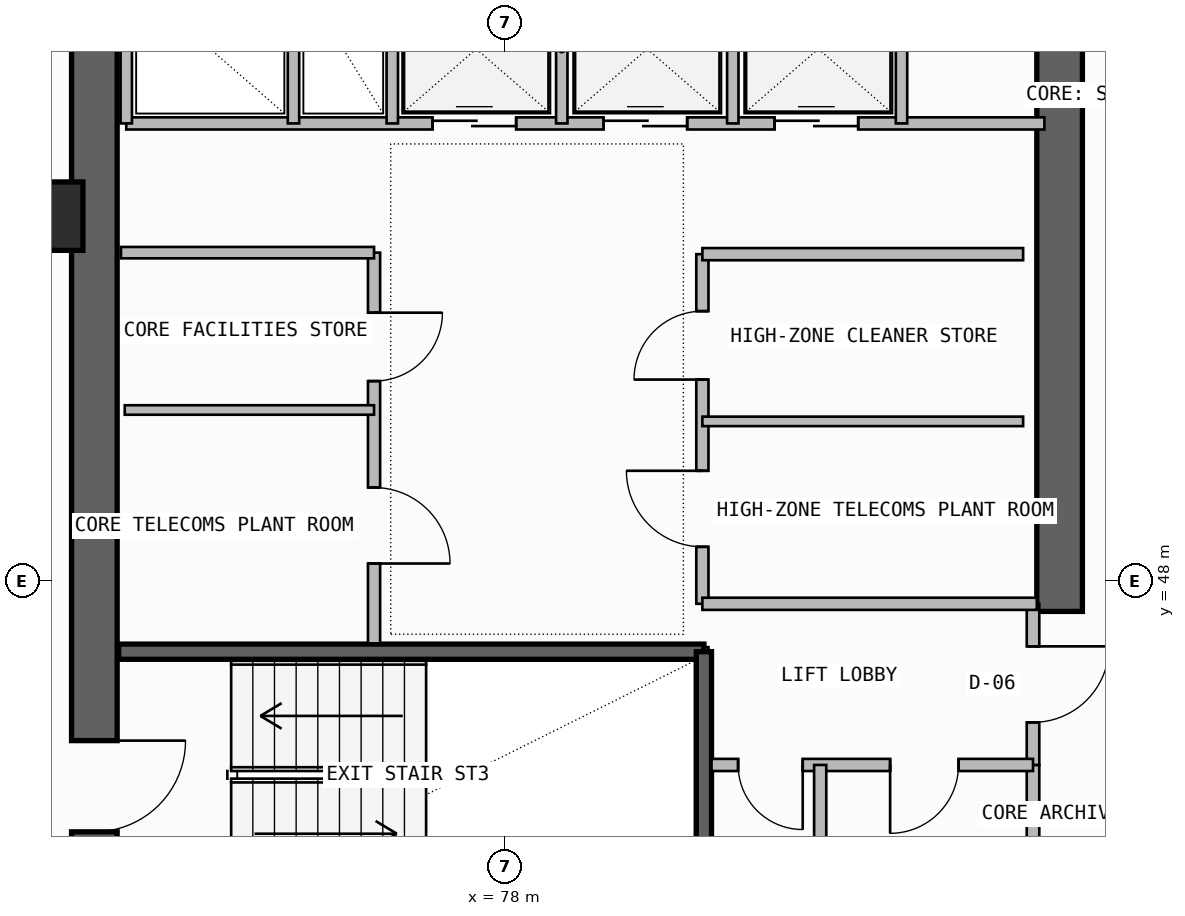
"""IFC4 building model, lengths in metres.
Left out: names, types, materials, properties, quantities, classifications, styles, units other than length and angle.
Written with IfcOpenShell. Run it as: python <this file> out.ifc"""

import sys

from ifc_helpers import new_model, si_unit, direction, frame, frame_2d, origin, origin_2d, place, context, subcontext, project, spatial, rectangle, extrude, element, fill, save


model = new_model("IFC4")
c1 = context("Model", 3, precision=1e-05, world=origin(), true_north=direction((0.0, 1.0)))
c2 = subcontext(c1, "Body", "Model", "MODEL_VIEW")
j1 = project(units=[si_unit("LENGTHUNIT", "METRE"), si_unit("PLANEANGLEUNIT", "RADIAN")], contexts=[c1])
p1 = place(None, origin())
s1 = spatial("IfcSite", under=j1, at=p1, CompositionType="ELEMENT")
p2 = place(p1, origin())
s2 = spatial("IfcBuilding", under=s1, at=p2, CompositionType="ELEMENT")
p3 = place(p2, frame((0.0, 0.0, 246.66)))
s3 = spatial("IfcBuildingStorey", under=s2, at=p3, CompositionType="ELEMENT", Elevation=246.66)
p4 = place(p3, frame((72.6, 43.35, -0.26), z_axis=(0.0, 0.0, 1.0), x_axis=(0.0, 1.0, 0.0)))
e1 = element("IfcWall", 1, at=p4, inside=s3, PredefinedType="SHEAR", context=c2, shape_type="SweptSolid", body=[
    extrude(rectangle(XDim=12.7, YDim=0.6, at=frame_2d((6.35, 0.0))), origin(), (0.0, 0.0, 1.0), 3.52),
])
p5 = place(p4, frame((1.35, 0.0, 0.26)))
e2 = element("IfcOpeningElement", 2, at=p5, cuts=e1, PredefinedType="OPENING", context=c2, shape_type="SweptSolid", body=[
    extrude(rectangle(XDim=1.2, YDim=2.2, at=frame_2d((0.6, 1.1))), frame((0.0, 0.31, 0.0), z_axis=(0.0, -1.0, 0.0), x_axis=(1.0, 0.0, 0.0)), (0.0, 0.0, 1.0), 0.62),
])
p6 = place(p3, frame((85.3, 47.6, -0.26), z_axis=(0.0, 0.0, 1.0), x_axis=(0.0, 1.0, 0.0)))
e3 = element("IfcWall", 3, at=p6, inside=s3, PredefinedType="SHEAR", context=c2, shape_type="SweptSolid", body=[
    extrude(rectangle(XDim=8.45, YDim=0.6, at=frame_2d((4.225, 0.0))), origin(), (0.0, 0.0, 1.0), 3.52),
])
p7 = place(p3, frame((72.0, 52.8, 0.0), z_axis=(0.0, 0.0, 1.0), x_axis=(1.0, 0.0, 0.0)))
e4 = element("IfcColumn", 4, at=p7, inside=s3, PredefinedType="COLUMN", context=c2, shape_type="SweptSolid", body=[
    extrude(rectangle(XDim=0.9, YDim=0.9, at=origin_2d()), origin(), (0.0, 0.0, 1.0), 3.52),
])
p8 = place(p3, frame((72.92, 47.07, -0.26), z_axis=(0.0, 0.0, 1.0), x_axis=(1.0, 0.0, 0.0)))
e5 = element("IfcWall", 5, at=p8, inside=s3, PredefinedType="SOLIDWALL", context=c2, shape_type="SweptSolid", body=[
    extrude(rectangle(XDim=7.7, YDim=0.2, at=frame_2d((3.85, 0.0))), origin(), (0.0, 0.0, 1.0), 3.52),
])
p9 = place(p3, frame((80.62, 43.83, -0.26), z_axis=(0.0, 0.0, 1.0), x_axis=(0.0, 1.0, 0.0)))
e6 = element("IfcWall", 6, at=p9, inside=s3, PredefinedType="SOLIDWALL", context=c2, shape_type="SweptSolid", body=[
    extrude(rectangle(XDim=3.24, YDim=0.2, at=frame_2d((1.62, 0.0))), origin(), (0.0, 0.0, 1.0), 3.52),
])
p10 = place(p3, frame((84.95, 43.68, 0.0), z_axis=(0.0, 0.0, 1.0), x_axis=(0.0, 1.0, 0.0)))
e7 = element("IfcWall", 7, at=p10, inside=s3, PredefinedType="PLUMBINGWALL", context=c2, shape_type="SweptSolid", body=[
    extrude(rectangle(XDim=1.9, YDim=0.165, at=frame_2d((0.95, 0.0))), origin(), (0.0, 0.0, 1.0), 3.26),
])
p11 = place(p3, frame((84.95, 45.58, 0.0), z_axis=(0.0, 0.0, 1.0), x_axis=(0.0, 1.0, 0.0)))
e8 = element("IfcWall", 8, at=p11, inside=s3, PredefinedType="PARTITIONING", context=c2, shape_type="SweptSolid", body=[
    extrude(rectangle(XDim=2.12, YDim=0.165, at=frame_2d((1.06, 0.0))), origin(), (0.0, 0.0, 1.0), 3.26),
])
p12 = place(p11, frame((0.56, 0.0, 0.0)))
e9 = element("IfcOpeningElement", 9, at=p12, cuts=e8, PredefinedType="OPENING", context=c2, shape_type="SweptSolid", body=[
    extrude(rectangle(XDim=1.0, YDim=2.2, at=frame_2d((0.5, 1.1))), frame((0.0, 0.093, 0.0), z_axis=(0.0, -1.0, 0.0), x_axis=(1.0, 0.0, 0.0)), (0.0, 0.0, 1.0), 0.185),
])
p13 = place(p3, frame((80.72, 45.58, 0.0), z_axis=(0.0, 0.0, 1.0), x_axis=(1.0, 0.0, 0.0)))
e10 = element("IfcWall", 10, at=p13, inside=s3, PredefinedType="PLUMBINGWALL", context=c2, shape_type="SweptSolid", body=[
    extrude(rectangle(XDim=4.23, YDim=0.16, at=frame_2d((2.115, 0.0))), origin(), (0.0, 0.0, 1.0), 3.26),
])
p14 = place(p13, frame((0.35, 0.0, 0.0)))
e11 = element("IfcOpeningElement", 11, at=p14, cuts=e10, PredefinedType="OPENING", context=c2, shape_type="SweptSolid", body=[
    extrude(rectangle(XDim=0.85, YDim=2.05, at=frame_2d((0.425, 1.025))), frame((0.0, 0.09, 0.0), z_axis=(0.0, -1.0, 0.0), x_axis=(1.0, 0.0, 0.0)), (0.0, 0.0, 1.0), 0.18),
])
p15 = place(p13, frame((2.35, 0.0, 0.0)))
e12 = element("IfcOpeningElement", 12, at=p15, cuts=e10, PredefinedType="OPENING", context=c2, shape_type="SweptSolid", body=[
    extrude(rectangle(XDim=0.9, YDim=2.1, at=frame_2d((0.45, 1.05))), frame((0.0, 0.09, 0.0), z_axis=(0.0, -1.0, 0.0), x_axis=(1.0, 0.0, 0.0)), (0.0, 0.0, 1.0), 0.18),
])
p16 = place(p3, frame((82.15, 43.68, 0.0), z_axis=(0.0, 0.0, 1.0), x_axis=(0.0, 1.0, 0.0)))
e13 = element("IfcWall", 13, at=p16, inside=s3, PredefinedType="PLUMBINGWALL", context=c2, shape_type="SweptSolid", body=[
    extrude(rectangle(XDim=1.9, YDim=0.16, at=frame_2d((0.95, 0.0))), origin(), (0.0, 0.0, 1.0), 3.26),
])
p17 = place(p3, frame((76.28, 47.18, 0.0), z_axis=(0.0, 0.0, 1.0), x_axis=(0.0, 1.0, 0.0)))
e14 = element("IfcWall", 14, at=p17, inside=s3, PredefinedType="SOLIDWALL", context=c2, shape_type="SweptSolid", body=[
    extrude(rectangle(XDim=5.14, YDim=0.16, at=frame_2d((2.57, 0.0))), origin(), (0.0, 0.0, 1.0), 3.26),
])
p18 = place(p17, frame((1.05, 0.0, 0.0)))
e15 = element("IfcOpeningElement", 15, at=p18, cuts=e14, PredefinedType="OPENING", context=c2, shape_type="SweptSolid", body=[
    extrude(rectangle(XDim=1.0, YDim=2.2, at=frame_2d((0.5, 1.1))), frame((0.0, 0.09, 0.0), z_axis=(0.0, -1.0, 0.0), x_axis=(1.0, 0.0, 0.0)), (0.0, 0.0, 1.0), 0.18),
])
p19 = place(p17, frame((3.45, 0.0, 0.0)))
e16 = element("IfcOpeningElement", 16, at=p19, cuts=e14, PredefinedType="OPENING", context=c2, shape_type="SweptSolid", body=[
    extrude(rectangle(XDim=0.9, YDim=2.1, at=frame_2d((0.45, 1.05))), frame((0.0, 0.09, 0.0), z_axis=(0.0, -1.0, 0.0), x_axis=(1.0, 0.0, 0.0)), (0.0, 0.0, 1.0), 0.18),
])
p20 = place(p3, frame((72.95, 52.32, 0.0), z_axis=(0.0, 0.0, 1.0), x_axis=(1.0, 0.0, 0.0)))
e17 = element("IfcWall", 17, at=p20, inside=s3, PredefinedType="SOLIDWALL", context=c2, shape_type="SweptSolid", body=[
    extrude(rectangle(XDim=3.33, YDim=0.15, at=frame_2d((1.665, 0.0))), origin(), (0.0, 0.0, 1.0), 3.26),
])
p21 = place(p3, frame((73.0, 50.25, 0.0), z_axis=(0.0, 0.0, 1.0), x_axis=(1.0, 0.0, 0.0)))
e18 = element("IfcWall", 18, at=p21, inside=s3, PredefinedType="PARTITIONING", context=c2, shape_type="SweptSolid", body=[
    extrude(rectangle(XDim=3.28, YDim=0.125, at=frame_2d((1.64, 0.0))), origin(), (0.0, 0.0, 1.0), 3.26),
])
p22 = place(p3, frame((80.6, 47.7, 0.0), z_axis=(0.0, 0.0, 1.0), x_axis=(0.0, 1.0, 0.0)))
e19 = element("IfcWall", 19, at=p22, inside=s3, PredefinedType="SOLIDWALL", context=c2, shape_type="SweptSolid", body=[
    extrude(rectangle(XDim=4.6, YDim=0.16, at=frame_2d((2.3, 0.0))), origin(), (0.0, 0.0, 1.0), 3.26),
])
p23 = place(p22, frame((0.75, 0.0, 0.0)))
e20 = element("IfcOpeningElement", 20, at=p23, cuts=e19, PredefinedType="OPENING", context=c2, shape_type="SweptSolid", body=[
    extrude(rectangle(XDim=1.0, YDim=2.2, at=frame_2d((0.5, 1.1))), frame((0.0, 0.09, 0.0), z_axis=(0.0, -1.0, 0.0), x_axis=(1.0, 0.0, 0.0)), (0.0, 0.0, 1.0), 0.18),
])
p24 = place(p22, frame((2.95, 0.0, 0.0)))
e21 = element("IfcOpeningElement", 21, at=p24, cuts=e19, PredefinedType="OPENING", context=c2, shape_type="SweptSolid", body=[
    extrude(rectangle(XDim=0.9, YDim=2.1, at=frame_2d((0.45, 1.05))), frame((0.0, 0.09, 0.0), z_axis=(0.0, -1.0, 0.0), x_axis=(1.0, 0.0, 0.0)), (0.0, 0.0, 1.0), 0.18),
])
p25 = place(p3, frame((80.6, 47.7, 0.0), z_axis=(0.0, 0.0, 1.0), x_axis=(1.0, 0.0, 0.0)))
e22 = element("IfcWall", 22, at=p25, inside=s3, PredefinedType="SOLIDWALL", context=c2, shape_type="SweptSolid", body=[
    extrude(rectangle(XDim=4.4, YDim=0.16, at=frame_2d((2.2, 0.0))), origin(), (0.0, 0.0, 1.0), 3.26),
])
p26 = place(p3, frame((80.6, 52.3, 0.0), z_axis=(0.0, 0.0, 1.0), x_axis=(1.0, 0.0, 0.0)))
e23 = element("IfcWall", 23, at=p26, inside=s3, PredefinedType="SOLIDWALL", context=c2, shape_type="SweptSolid", body=[
    extrude(rectangle(XDim=4.22, YDim=0.16, at=frame_2d((2.11, 0.0))), origin(), (0.0, 0.0, 1.0), 3.26),
])
p27 = place(p3, frame((80.6, 50.1, 0.0), z_axis=(0.0, 0.0, 1.0), x_axis=(1.0, 0.0, 0.0)))
e24 = element("IfcWall", 24, at=p27, inside=s3, PredefinedType="PARTITIONING", context=c2, shape_type="SweptSolid", body=[
    extrude(rectangle(XDim=4.22, YDim=0.125, at=frame_2d((2.11, 0.0))), origin(), (0.0, 0.0, 1.0), 3.26),
])
p28 = place(p3, frame((73.02, 54.02, 0.0), z_axis=(0.0, 0.0, 1.0), x_axis=(1.0, 0.0, 0.0)))
e25 = element("IfcWall", 25, at=p28, inside=s3, PredefinedType="SOLIDWALL", context=c2, shape_type="SweptSolid", body=[
    extrude(rectangle(XDim=12.08, YDim=0.16, at=frame_2d((6.04, 0.0))), origin(), (0.0, 0.0, 1.0), 3.26),
])
p29 = place(p28, frame((4.03, 0.0, 0.0)))
e26 = element("IfcOpeningElement", 26, at=p29, cuts=e25, PredefinedType="OPENING", context=c2, shape_type="SweptSolid", body=[
    extrude(rectangle(XDim=1.1, YDim=2.25, at=frame_2d((0.55, 1.125))), frame((0.0, 0.09, 0.0), z_axis=(0.0, -1.0, 0.0), x_axis=(1.0, 0.0, 0.0)), (0.0, 0.0, 1.0), 0.18),
])
p30 = place(p28, frame((6.28, 0.0, 0.0)))
e27 = element("IfcOpeningElement", 27, at=p30, cuts=e25, PredefinedType="OPENING", context=c2, shape_type="SweptSolid", body=[
    extrude(rectangle(XDim=1.1, YDim=2.25, at=frame_2d((0.55, 1.125))), frame((0.0, 0.09, 0.0), z_axis=(0.0, -1.0, 0.0), x_axis=(1.0, 0.0, 0.0)), (0.0, 0.0, 1.0), 0.18),
])
p31 = place(p28, frame((8.53, 0.0, 0.0)))
e28 = element("IfcOpeningElement", 28, at=p31, cuts=e25, PredefinedType="OPENING", context=c2, shape_type="SweptSolid", body=[
    extrude(rectangle(XDim=1.1, YDim=2.25, at=frame_2d((0.55, 1.125))), frame((0.0, 0.09, 0.0), z_axis=(0.0, -1.0, 0.0), x_axis=(1.0, 0.0, 0.0)), (0.0, 0.0, 1.0), 0.18),
])
p32 = place(p3, frame((73.02, 54.02, 0.0), z_axis=(0.0, 0.0, 1.0), x_axis=(0.0, 1.0, 0.0)))
e29 = element("IfcWall", 29, at=p32, inside=s3, PredefinedType="PLUMBINGWALL", context=c2, shape_type="SweptSolid", body=[
    extrude(rectangle(XDim=1.94, YDim=0.15, at=frame_2d((0.97, 0.0))), origin(), (0.0, 0.0, 1.0), 3.26),
])
p33 = place(p3, frame((76.52, 54.02, 0.0), z_axis=(0.0, 0.0, 1.0), x_axis=(0.0, 1.0, 0.0)))
e30 = element("IfcWall", 30, at=p33, inside=s3, PredefinedType="SOLIDWALL", context=c2, shape_type="SweptSolid", body=[
    extrude(rectangle(XDim=1.94, YDim=0.15, at=frame_2d((0.97, 0.0))), origin(), (0.0, 0.0, 1.0), 3.26),
])
p34 = place(p3, frame((75.22, 54.02, 0.0), z_axis=(0.0, 0.0, 1.0), x_axis=(0.0, 1.0, 0.0)))
e31 = element("IfcWall", 31, at=p34, inside=s3, PredefinedType="PLUMBINGWALL", context=c2, shape_type="SweptSolid", body=[
    extrude(rectangle(XDim=1.94, YDim=0.15, at=frame_2d((0.97, 0.0))), origin(), (0.0, 0.0, 1.0), 3.26),
])
for number, where, z_axis, x_axis in (
    (32, (78.75, 54.02, 0.0), (0.0, 0.0, 1.0), (0.0, 1.0, 0.0)),
    (33, (81.0, 54.02, 0.0), (0.0, 0.0, 1.0), (0.0, 1.0, 0.0)),
):
    element("IfcWall", number, at=place(p3, frame(where, z_axis=z_axis, x_axis=x_axis)), inside=s3, PredefinedType="PLUMBINGWALL", context=c2, shape_type="SweptSolid", body=[
        extrude(rectangle(XDim=1.96, YDim=0.15, at=frame_2d((0.98, 0.0))), origin(), (0.0, 0.0, 1.0), 3.26),
    ])
p35 = place(p3, frame((83.22, 54.02, 0.0), z_axis=(0.0, 0.0, 1.0), x_axis=(0.0, 1.0, 0.0)))
e34 = element("IfcWall", 34, at=p35, inside=s3, PredefinedType="SOLIDWALL", context=c2, shape_type="SweptSolid", body=[
    extrude(rectangle(XDim=1.96, YDim=0.15, at=frame_2d((0.98, 0.0))), origin(), (0.0, 0.0, 1.0), 3.26),
])
p36 = place(p5, frame((1.2, 0.0, 0.0), z_axis=(0.0, 0.0, 1.0), x_axis=(-1.0, 0.0, 0.0)))
e35 = element("IfcDoor", 35, at=p36, inside=s3, OperationType="SINGLE_SWING_LEFT", PredefinedType="USERDEFINED", context=c2, shape_type="SweptSolid", body=[
    extrude(rectangle(XDim=1.2, YDim=2.2, at=frame_2d((0.6, 1.1))), frame((0.0, 0.025, 0.0), z_axis=(0.0, -1.0, 0.0), x_axis=(1.0, 0.0, 0.0)), (0.0, 0.0, 1.0), 0.05),
])
fill(e2, e35)
p37 = place(p12, frame((1.0, 0.0, 0.0), z_axis=(0.0, 0.0, 1.0), x_axis=(-1.0, 0.0, 0.0)))
e36 = element("IfcDoor", 36, at=p37, inside=s3, OperationType="SINGLE_SWING_LEFT", PredefinedType="DOOR", context=c2, shape_type="SweptSolid", body=[
    extrude(rectangle(XDim=1.0, YDim=2.2, at=frame_2d((0.5, 1.1))), frame((0.0, 0.025, 0.0), z_axis=(0.0, -1.0, 0.0), x_axis=(1.0, 0.0, 0.0)), (0.0, 0.0, 1.0), 0.05),
])
fill(e9, e36)
p38 = place(p14, frame((0.85, 0.0, 0.0), z_axis=(0.0, 0.0, 1.0), x_axis=(-1.0, 0.0, 0.0)))
e37 = element("IfcDoor", 37, at=p38, inside=s3, OperationType="SINGLE_SWING_LEFT", PredefinedType="DOOR", context=c2, shape_type="SweptSolid", body=[
    extrude(rectangle(XDim=0.85, YDim=2.05, at=frame_2d((0.425, 1.025))), frame((0.0, 0.025, 0.0), z_axis=(0.0, -1.0, 0.0), x_axis=(1.0, 0.0, 0.0)), (0.0, 0.0, 1.0), 0.05),
])
fill(e11, e37)
p39 = place(p15, frame((0.9, 0.0, 0.0), z_axis=(0.0, 0.0, 1.0), x_axis=(-1.0, 0.0, 0.0)))
e38 = element("IfcDoor", 38, at=p39, inside=s3, OperationType="SINGLE_SWING_RIGHT", PredefinedType="DOOR", context=c2, shape_type="SweptSolid", body=[
    extrude(rectangle(XDim=0.9, YDim=2.1, at=frame_2d((0.45, 1.05))), frame((0.0, 0.025, 0.0), z_axis=(0.0, -1.0, 0.0), x_axis=(1.0, 0.0, 0.0)), (0.0, 0.0, 1.0), 0.05),
])
fill(e12, e38)
p40 = place(p18, frame((1.0, 0.0, 0.0), z_axis=(0.0, 0.0, 1.0), x_axis=(-1.0, 0.0, 0.0)))
e39 = element("IfcDoor", 39, at=p40, inside=s3, OperationType="SINGLE_SWING_RIGHT", PredefinedType="DOOR", context=c2, shape_type="SweptSolid", body=[
    extrude(rectangle(XDim=1.0, YDim=2.2, at=frame_2d((0.5, 1.1))), frame((0.0, 0.025, 0.0), z_axis=(0.0, -1.0, 0.0), x_axis=(1.0, 0.0, 0.0)), (0.0, 0.0, 1.0), 0.05),
])
fill(e15, e39)
p41 = place(p19, frame((0.9, 0.0, 0.0), z_axis=(0.0, 0.0, 1.0), x_axis=(-1.0, 0.0, 0.0)))
e40 = element("IfcDoor", 40, at=p41, inside=s3, OperationType="SINGLE_SWING_LEFT", PredefinedType="DOOR", context=c2, shape_type="SweptSolid", body=[
    extrude(rectangle(XDim=0.9, YDim=2.1, at=frame_2d((0.45, 1.05))), frame((0.0, 0.025, 0.0), z_axis=(0.0, -1.0, 0.0), x_axis=(1.0, 0.0, 0.0)), (0.0, 0.0, 1.0), 0.05),
])
fill(e16, e40)
p42 = place(p23, origin())
e41 = element("IfcDoor", 41, at=p42, inside=s3, OperationType="SINGLE_SWING_RIGHT", PredefinedType="DOOR", context=c2, shape_type="SweptSolid", body=[
    extrude(rectangle(XDim=1.0, YDim=2.2, at=frame_2d((0.5, 1.1))), frame((0.0, 0.025, 0.0), z_axis=(0.0, -1.0, 0.0), x_axis=(1.0, 0.0, 0.0)), (0.0, 0.0, 1.0), 0.05),
])
fill(e20, e41)
p43 = place(p24, origin())
e42 = element("IfcDoor", 42, at=p43, inside=s3, OperationType="SINGLE_SWING_LEFT", PredefinedType="DOOR", context=c2, shape_type="SweptSolid", body=[
    extrude(rectangle(XDim=0.9, YDim=2.1, at=frame_2d((0.45, 1.05))), frame((0.0, 0.025, 0.0), z_axis=(0.0, -1.0, 0.0), x_axis=(1.0, 0.0, 0.0)), (0.0, 0.0, 1.0), 0.05),
])
fill(e21, e42)
p44 = place(p29, origin())
e43 = element("IfcDoor", 43, at=p44, inside=s3, OperationType="DOUBLE_DOOR_SLIDING", PredefinedType="DOOR", context=c2, shape_type="SweptSolid", body=[
    extrude(rectangle(XDim=1.1, YDim=2.25, at=frame_2d((0.55, 1.125))), frame((0.0, 0.025, 0.0), z_axis=(0.0, -1.0, 0.0), x_axis=(1.0, 0.0, 0.0)), (0.0, 0.0, 1.0), 0.05),
])
fill(e26, e43)
p45 = place(p30, origin())
e44 = element("IfcDoor", 44, at=p45, inside=s3, OperationType="DOUBLE_DOOR_SLIDING", PredefinedType="DOOR", context=c2, shape_type="SweptSolid", body=[
    extrude(rectangle(XDim=1.1, YDim=2.25, at=frame_2d((0.55, 1.125))), frame((0.0, 0.025, 0.0), z_axis=(0.0, -1.0, 0.0), x_axis=(1.0, 0.0, 0.0)), (0.0, 0.0, 1.0), 0.05),
])
fill(e27, e44)
p46 = place(p31, origin())
e45 = element("IfcDoor", 45, at=p46, inside=s3, OperationType="DOUBLE_DOOR_SLIDING", PredefinedType="DOOR", context=c2, shape_type="SweptSolid", body=[
    extrude(rectangle(XDim=1.1, YDim=2.25, at=frame_2d((0.55, 1.125))), frame((0.0, 0.025, 0.0), z_axis=(0.0, -1.0, 0.0), x_axis=(1.0, 0.0, 0.0)), (0.0, 0.0, 1.0), 0.05),
])
fill(e28, e45)
save(model, sys.argv[1])
